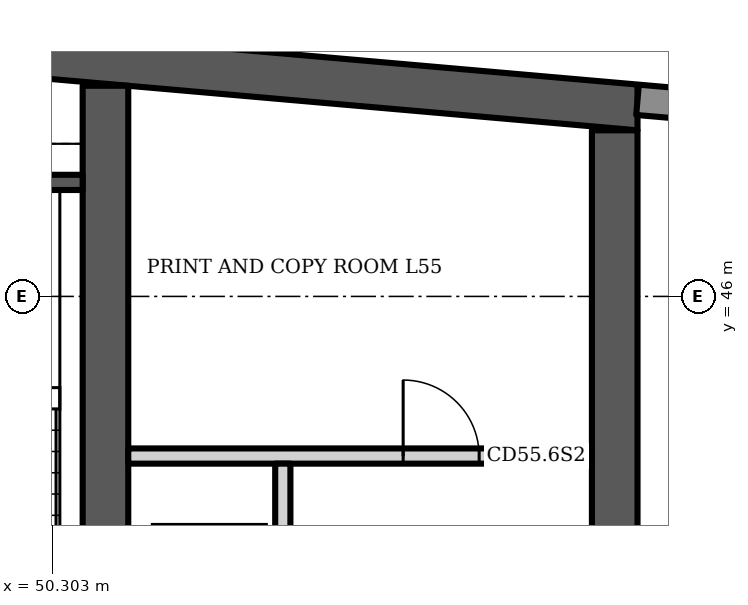
"""IFC4 building model, lengths in metres.
Left out: names, types, materials, properties, quantities, classifications, styles, units other than length and angle.
Written with IfcOpenShell. Run it as: python <this file> out.ifc"""

import sys

from ifc_helpers import new_model, si_unit, direction, frame, frame_2d, origin, place, context, subcontext, project, spatial, polyline, rectangle, outline, extrude, element, fill, save


model = new_model("IFC4")
c1 = context("Model", 3, precision=1e-05, world=origin(), true_north=direction((0.0, 1.0)))
c2 = subcontext(c1, "Body", "Model", "MODEL_VIEW")
j1 = project(units=[si_unit("LENGTHUNIT", "METRE"), si_unit("PLANEANGLEUNIT", "RADIAN")], contexts=[c1])
p1 = place(None, origin())
s1 = spatial("IfcSite", under=j1, at=p1, CompositionType="ELEMENT")
p2 = place(p1, origin())
s2 = spatial("IfcBuilding", under=s1, at=p2, CompositionType="ELEMENT")
p3 = place(p2, frame((0.0, 0.0, 221.5)))
s3 = spatial("IfcBuildingStorey", under=s2, at=p3, CompositionType="ELEMENT", Elevation=221.5)
p4 = place(p3, origin())
e1 = element("IfcWall", 1, at=p4, inside=s3, PredefinedType="SHEAR", context=c2, shape_type="SweptSolid", body=[
    extrude(outline(polyline([(23.0, 48.185), (40.5, 49.716), (58.0, 48.185), (58.0, 48.787), (40.5, 50.318), (23.0, 48.787), (23.0, 48.185)])), origin(), (0.0, 0.0, 1.0), 3.6),
])
p5 = place(p3, frame((51.0, 34.6, 0.0), z_axis=(0.0, 0.0, 1.0), x_axis=(0.0, 1.0, 0.0)))
e2 = element("IfcWall", 2, at=p5, inside=s3, PredefinedType="SHEAR", context=c2, shape_type="SweptSolid", body=[
    extrude(rectangle(XDim=14.171, YDim=0.6, at=frame_2d((7.085, 0.0))), origin(), (0.0, 0.0, 1.0), 3.6),
])
p6 = place(p5, frame((3.8, 0.0, 0.0)))
e3 = element("IfcOpeningElement", 3, at=p6, cuts=e2, PredefinedType="OPENING", context=c2, shape_type="SweptSolid", body=[
    extrude(rectangle(XDim=1.1, YDim=2.1, at=frame_2d((0.55, 1.05))), frame((0.0, 0.31, 0.0), z_axis=(0.0, -1.0, 0.0), x_axis=(1.0, 0.0, 0.0)), (0.0, 0.0, 1.0), 0.62),
])
p7 = place(p3, frame((57.7, 34.6, 0.0), z_axis=(0.0, 0.0, 1.0), x_axis=(0.0, 1.0, 0.0)))
e4 = element("IfcWall", 4, at=p7, inside=s3, PredefinedType="SHEAR", context=c2, shape_type="SweptSolid", body=[
    extrude(rectangle(XDim=13.585, YDim=0.6, at=frame_2d((6.792, 0.0))), origin(), (0.0, 0.0, 1.0), 3.6),
])
p8 = place(p3, frame((60.983, 48.326, 0.0), z_axis=(0.0, 0.0, 1.0), x_axis=(-0.996194, 0.087168, 0.0)))
e5 = element("IfcWall", 5, at=p8, inside=s3, PredefinedType="SOLIDWALL", context=c2, shape_type="SweptSolid", body=[
    extrude(rectangle(XDim=2.994, YDim=0.4, at=frame_2d((1.497, 0.0))), origin(), (0.0, 0.0, 1.0), 3.2),
])
p9 = place(p3, frame((46.75, 47.5, 0.0), z_axis=(0.0, 0.0, 1.0), x_axis=(1.0, 0.0, 0.0)))
e6 = element("IfcWall", 6, at=p9, inside=s3, PredefinedType="SHEAR", context=c2, shape_type="SweptSolid", body=[
    extrude(rectangle(XDim=3.95, YDim=0.2, at=frame_2d((1.975, 0.0))), origin(), (0.0, 0.0, 1.0), 3.2),
])
p10 = place(p3, frame((51.3, 43.9, 0.0), z_axis=(0.0, 0.0, 1.0), x_axis=(1.0, 0.0, 0.0)))
e7 = element("IfcWall", 7, at=p10, inside=s3, PredefinedType="PARTITIONING", context=c2, shape_type="SweptSolid", body=[
    extrude(rectangle(XDim=6.1, YDim=0.2, at=frame_2d((3.05, 0.0))), origin(), (0.0, 0.0, 1.0), 3.2),
])
p11 = place(p10, frame((3.617, 0.0, 0.0)))
e8 = element("IfcOpeningElement", 8, at=p11, cuts=e7, PredefinedType="OPENING", context=c2, shape_type="SweptSolid", body=[
    extrude(rectangle(XDim=1.0, YDim=2.1, at=frame_2d((0.5, 1.05))), frame((0.0, 0.11, 0.0), z_axis=(0.0, -1.0, 0.0), x_axis=(1.0, 0.0, 0.0)), (0.0, 0.0, 1.0), 0.22),
])
p12 = place(p3, frame((0.0, 0.0, -0.0)))
e9 = element("IfcWall", 9, at=p12, inside=s3, PredefinedType="PARTITIONING", context=c2, shape_type="SweptSolid", body=[
    extrude(outline(polyline([(53.433, 40.8), (53.433, 43.8), (53.233, 43.8), (53.233, 40.8), (53.433, 40.8)])), origin(), (0.0, 0.0, 1.0), 3.2),
])
p13 = place(p11, origin())
e10 = element("IfcDoor", 10, at=p13, inside=s3, OperationType="SINGLE_SWING_LEFT", PredefinedType="DOOR", context=c2, shape_type="SweptSolid", body=[
    extrude(rectangle(XDim=1.0, YDim=2.1, at=frame_2d((0.5, 1.05))), frame((0.0, 0.025, 0.0), z_axis=(0.0, -1.0, 0.0), x_axis=(1.0, 0.0, 0.0)), (0.0, 0.0, 1.0), 0.05),
])
fill(e8, e10)
save(model, sys.argv[1])
